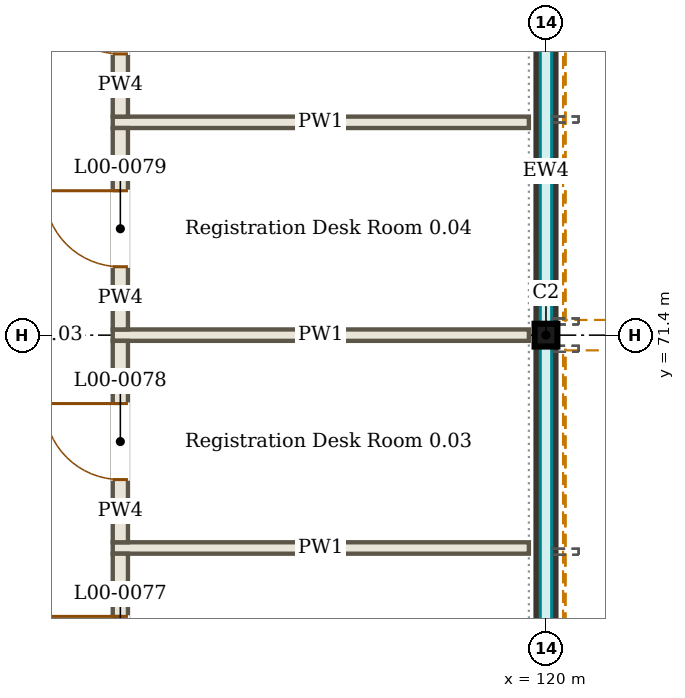
"""IFC4 building model, lengths in metres.
Left out: names, types, materials, properties, quantities, classifications, styles, units other than length and angle.
Written with IfcOpenShell. Run it as: python <this file> out.ifc"""

import sys

from ifc_helpers import new_model, si_unit, direction, frame, frame_2d, origin, origin_2d, place, context, subcontext, project, spatial, rectangle, i_section, extrude, element, fill, save


model = new_model("IFC4")
c1 = context("Model", 3, precision=1e-05, world=origin(), true_north=direction((0.0, 1.0)))
c2 = subcontext(c1, "Body", "Model", "MODEL_VIEW")
j1 = project(units=[si_unit("LENGTHUNIT", "METRE"), si_unit("PLANEANGLEUNIT", "RADIAN")], contexts=[c1])
p1 = place(None, origin())
s1 = spatial("IfcSite", under=j1, at=p1, CompositionType="ELEMENT")
p2 = place(p1, origin())
s2 = spatial("IfcBuilding", under=s1, at=p2, CompositionType="ELEMENT")
p3 = place(p2, origin())
s3 = spatial("IfcBuildingStorey", under=s2, at=p3, CompositionType="ELEMENT", Elevation=0.0)
p4 = place(p3, frame((120.0, 71.4, 0.0), z_axis=(0.0, 0.0, 1.0), x_axis=(1.0, 0.0, 0.0)))
e1 = element("IfcColumn", 1, at=p4, inside=s3, PredefinedType="COLUMN", context=c2, shape_type="SweptSolid", body=[
    extrude(i_section(OverallWidth=0.3, OverallDepth=0.3, WebThickness=0.011, FlangeThickness=0.019, FilletRadius=0.027, at=origin_2d()), origin(), (0.0, 0.0, 1.0), 4.5),
])
p5 = place(p3, frame((120.0, 63.15, 0.0), z_axis=(0.0, 0.0, 1.0), x_axis=(0.0, 1.0, 0.0)))
e2 = element("IfcWall", 2, at=p5, inside=s3, PredefinedType="SOLIDWALL", context=c2, shape_type="SweptSolid", body=[
    extrude(rectangle(XDim=8.1, YDim=0.25, at=frame_2d((4.05, 0.0))), origin(), (0.0, 0.0, 1.0), 0.45),
])
p6 = place(p3, frame((120.16, 63.15, 3.82), z_axis=(0.0, 0.0, 1.0), x_axis=(0.0, 1.0, 0.0)))
e3 = element("IfcWall", 3, at=p6, inside=s3, PredefinedType="SOLIDWALL", context=c2, shape_type="SweptSolid", body=[
    extrude(rectangle(XDim=8.1, YDim=0.13, at=frame_2d((4.05, 0.0))), origin(), (0.0, 0.0, 1.0), 0.68),
])
p7 = place(p3, frame((120.0, 71.55, 0.0), z_axis=(0.0, 0.0, 1.0), x_axis=(0.0, 1.0, 0.0)))
e4 = element("IfcWall", 4, at=p7, inside=s3, PredefinedType="SOLIDWALL", context=c2, shape_type="SweptSolid", body=[
    extrude(rectangle(XDim=8.06, YDim=0.25, at=frame_2d((4.03, 0.0))), origin(), (0.0, 0.0, 1.0), 0.45),
])
p8 = place(p3, frame((120.16, 71.55, 3.82), z_axis=(0.0, 0.0, 1.0), x_axis=(0.0, 1.0, 0.0)))
e5 = element("IfcWall", 5, at=p8, inside=s3, PredefinedType="SOLIDWALL", context=c2, shape_type="SweptSolid", body=[
    extrude(rectangle(XDim=8.06, YDim=0.13, at=frame_2d((4.03, 0.0))), origin(), (0.0, 0.0, 1.0), 0.68),
])
p9 = place(p3, frame((114.3, 68.6, 0.0), z_axis=(0.0, 0.0, 1.0), x_axis=(1.0, 0.0, 0.0)))
e6 = element("IfcWall", 6, at=p9, inside=s3, PredefinedType="PARTITIONING", context=c2, shape_type="SweptSolid", body=[
    extrude(rectangle(XDim=5.475, YDim=0.15, at=frame_2d((2.737, 0.0))), origin(), (0.0, 0.0, 1.0), 3.95),
])
p10 = place(p3, frame((114.3, 71.4, 0.0), z_axis=(0.0, 0.0, 1.0), x_axis=(1.0, 0.0, 0.0)))
e7 = element("IfcWall", 7, at=p10, inside=s3, PredefinedType="PARTITIONING", context=c2, shape_type="SweptSolid", body=[
    extrude(rectangle(XDim=5.475, YDim=0.15, at=frame_2d((2.737, 0.0))), origin(), (0.0, 0.0, 1.0), 3.8),
])
p11 = place(p3, frame((114.3, 74.2, 0.0), z_axis=(0.0, 0.0, 1.0), x_axis=(1.0, 0.0, 0.0)))
e8 = element("IfcWall", 8, at=p11, inside=s3, PredefinedType="PARTITIONING", context=c2, shape_type="SweptSolid", body=[
    extrude(rectangle(XDim=5.475, YDim=0.15, at=frame_2d((2.737, 0.0))), origin(), (0.0, 0.0, 1.0), 3.95),
])
p12 = place(p3, frame((114.4, 65.875, 0.0), z_axis=(0.0, 0.0, 1.0), x_axis=(0.0, 1.0, 0.0)))
e9 = element("IfcWall", 9, at=p12, inside=s3, PredefinedType="PARTITIONING", context=c2, shape_type="SweptSolid", body=[
    extrude(rectangle(XDim=2.65, YDim=0.2, at=frame_2d((1.325, 0.0))), origin(), (0.0, 0.0, 1.0), 3.95),
])
p13 = place(p12, frame((0.825, 0.0, 0.0)))
e10 = element("IfcOpeningElement", 10, at=p13, cuts=e9, PredefinedType="OPENING", context=c2, shape_type="SweptSolid", body=[
    extrude(rectangle(XDim=1.0, YDim=2.1, at=frame_2d((0.5, 1.05))), frame((0.0, 0.11, 0.0), z_axis=(0.0, -1.0, 0.0), x_axis=(1.0, 0.0, 0.0)), (0.0, 0.0, 1.0), 0.22),
])
p14 = place(p3, frame((114.4, 68.675, 0.0), z_axis=(0.0, 0.0, 1.0), x_axis=(0.0, 1.0, 0.0)))
e11 = element("IfcWall", 11, at=p14, inside=s3, PredefinedType="PARTITIONING", context=c2, shape_type="SweptSolid", body=[
    extrude(rectangle(XDim=2.65, YDim=0.2, at=frame_2d((1.325, 0.0))), origin(), (0.0, 0.0, 1.0), 3.8),
])
p15 = place(p14, frame((0.825, 0.0, 0.0)))
e12 = element("IfcOpeningElement", 12, at=p15, cuts=e11, PredefinedType="OPENING", context=c2, shape_type="SweptSolid", body=[
    extrude(rectangle(XDim=1.0, YDim=2.1, at=frame_2d((0.5, 1.05))), frame((0.0, 0.11, 0.0), z_axis=(0.0, -1.0, 0.0), x_axis=(1.0, 0.0, 0.0)), (0.0, 0.0, 1.0), 0.22),
])
p16 = place(p3, frame((114.4, 71.475, 0.0), z_axis=(0.0, 0.0, 1.0), x_axis=(0.0, 1.0, 0.0)))
e13 = element("IfcWall", 13, at=p16, inside=s3, PredefinedType="PARTITIONING", context=c2, shape_type="SweptSolid", body=[
    extrude(rectangle(XDim=2.65, YDim=0.2, at=frame_2d((1.325, 0.0))), origin(), (0.0, 0.0, 1.0), 3.8),
])
p17 = place(p16, frame((0.825, 0.0, 0.0)))
e14 = element("IfcOpeningElement", 14, at=p17, cuts=e13, PredefinedType="OPENING", context=c2, shape_type="SweptSolid", body=[
    extrude(rectangle(XDim=1.0, YDim=2.1, at=frame_2d((0.5, 1.05))), frame((0.0, 0.11, 0.0), z_axis=(0.0, -1.0, 0.0), x_axis=(1.0, 0.0, 0.0)), (0.0, 0.0, 1.0), 0.22),
])
p18 = place(p3, frame((114.4, 74.275, 0.0), z_axis=(0.0, 0.0, 1.0), x_axis=(0.0, 1.0, 0.0)))
e15 = element("IfcWall", 15, at=p18, inside=s3, PredefinedType="PARTITIONING", context=c2, shape_type="SweptSolid", body=[
    extrude(rectangle(XDim=2.635, YDim=0.2, at=frame_2d((1.317, 0.0))), origin(), (0.0, 0.0, 1.0), 3.95),
])
p19 = place(p18, frame((0.825, 0.0, 0.0)))
e16 = element("IfcOpeningElement", 16, at=p19, cuts=e15, PredefinedType="OPENING", context=c2, shape_type="SweptSolid", body=[
    extrude(rectangle(XDim=1.0, YDim=2.1, at=frame_2d((0.5, 1.05))), frame((0.0, 0.11, 0.0), z_axis=(0.0, -1.0, 0.0), x_axis=(1.0, 0.0, 0.0)), (0.0, 0.0, 1.0), 0.22),
])
p20 = place(p13, origin())
e17 = element("IfcDoor", 17, at=p20, inside=s3, OperationType="SINGLE_SWING_RIGHT", PredefinedType="DOOR", context=c2, shape_type="SweptSolid", body=[
    extrude(rectangle(XDim=1.0, YDim=2.1, at=frame_2d((0.5, 1.05))), frame((0.0, 0.025, 0.0), z_axis=(0.0, -1.0, 0.0), x_axis=(1.0, 0.0, 0.0)), (0.0, 0.0, 1.0), 0.05),
])
fill(e10, e17)
p21 = place(p15, origin())
e18 = element("IfcDoor", 18, at=p21, inside=s3, OperationType="SINGLE_SWING_RIGHT", PredefinedType="DOOR", context=c2, shape_type="SweptSolid", body=[
    extrude(rectangle(XDim=1.0, YDim=2.1, at=frame_2d((0.5, 1.05))), frame((0.0, 0.025, 0.0), z_axis=(0.0, -1.0, 0.0), x_axis=(1.0, 0.0, 0.0)), (0.0, 0.0, 1.0), 0.05),
])
fill(e12, e18)
p22 = place(p17, origin())
e19 = element("IfcDoor", 19, at=p22, inside=s3, OperationType="SINGLE_SWING_RIGHT", PredefinedType="DOOR", context=c2, shape_type="SweptSolid", body=[
    extrude(rectangle(XDim=1.0, YDim=2.1, at=frame_2d((0.5, 1.05))), frame((0.0, 0.025, 0.0), z_axis=(0.0, -1.0, 0.0), x_axis=(1.0, 0.0, 0.0)), (0.0, 0.0, 1.0), 0.05),
])
fill(e14, e19)
p23 = place(p19, origin())
e20 = element("IfcDoor", 20, at=p23, inside=s3, OperationType="SINGLE_SWING_RIGHT", PredefinedType="DOOR", context=c2, shape_type="SweptSolid", body=[
    extrude(rectangle(XDim=1.0, YDim=2.1, at=frame_2d((0.5, 1.05))), frame((0.0, 0.025, 0.0), z_axis=(0.0, -1.0, 0.0), x_axis=(1.0, 0.0, 0.0)), (0.0, 0.0, 1.0), 0.05),
])
fill(e16, e20)
save(model, sys.argv[1])
